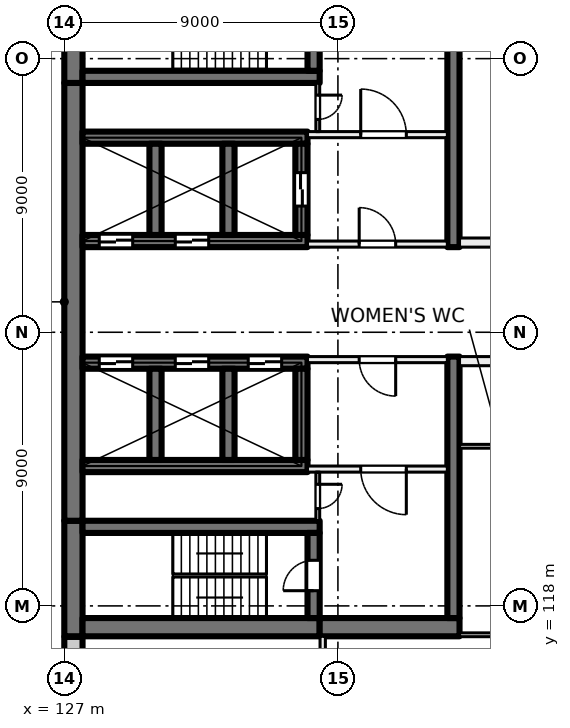
"""IFC4 building model, lengths in metres.
Left out: names, types, materials, properties, quantities, classifications, styles, units other than length and angle.
Written with IfcOpenShell. Run it as: python <this file> out.ifc"""

import sys

from ifc_helpers import new_model, si_unit, direction, frame, frame_2d, origin, place, context, subcontext, project, spatial, rectangle, extrude, element, fill, save


model = new_model("IFC4")
c1 = context("Model", 3, precision=1e-05, world=origin(), true_north=direction((0.0, 1.0)))
c2 = subcontext(c1, "Body", "Model", "MODEL_VIEW")
j1 = project(units=[si_unit("LENGTHUNIT", "METRE"), si_unit("PLANEANGLEUNIT", "RADIAN")], contexts=[c1])
p1 = place(None, origin())
s1 = spatial("IfcSite", under=j1, at=p1, CompositionType="ELEMENT")
p2 = place(p1, origin())
s2 = spatial("IfcBuilding", under=s1, at=p2, CompositionType="ELEMENT")
p3 = place(p2, frame((0.0, 0.0, 67.5)))
s3 = spatial("IfcBuildingStorey", under=s2, at=p3, CompositionType="ELEMENT", Elevation=67.5)
p4 = place(p3, frame((127.3, 117.0, 0.0), z_axis=(0.0, 0.0, 1.0), x_axis=(0.0, 1.0, 0.0)))
e1 = element("IfcWall", 1, at=p4, inside=s3, PredefinedType="SHEAR", context=c2, shape_type="SweptSolid", body=[
    extrude(rectangle(XDim=3.8, YDim=0.6, at=frame_2d((1.9, 0.0))), origin(), (0.0, 0.0, 1.0), 4.0),
])
p5 = place(p3, frame((127.3, 120.8, 0.0), z_axis=(0.0, 0.0, 1.0), x_axis=(0.0, 1.0, 0.0)))
e2 = element("IfcWall", 2, at=p5, inside=s3, PredefinedType="SHEAR", context=c2, shape_type="SweptSolid", body=[
    extrude(rectangle(XDim=14.4, YDim=0.6, at=frame_2d((7.2, 0.0))), origin(), (0.0, 0.0, 1.0), 4.0),
])
p6 = place(p3, frame((127.3, 135.2, 0.0), z_axis=(0.0, 0.0, 1.0), x_axis=(0.0, 1.0, 0.0)))
e3 = element("IfcWall", 3, at=p6, inside=s3, PredefinedType="SHEAR", context=c2, shape_type="SweptSolid", body=[
    extrude(rectangle(XDim=3.8, YDim=0.6, at=frame_2d((1.9, 0.0))), origin(), (0.0, 0.0, 1.0), 4.0),
])
p7 = place(p3, frame((127.6, 117.3, 0.0), z_axis=(0.0, 0.0, 1.0), x_axis=(1.0, 0.0, 0.0)))
e4 = element("IfcWall", 4, at=p7, inside=s3, PredefinedType="SHEAR", context=c2, shape_type="SweptSolid", body=[
    extrude(rectangle(XDim=7.8, YDim=0.6, at=frame_2d((3.9, 0.0))), origin(), (0.0, 0.0, 1.0), 4.0),
])
p8 = place(p3, frame((135.4, 117.3, 0.0), z_axis=(0.0, 0.0, 1.0), x_axis=(1.0, 0.0, 0.0)))
e5 = element("IfcWall", 5, at=p8, inside=s3, PredefinedType="SHEAR", context=c2, shape_type="SweptSolid", body=[
    extrude(rectangle(XDim=4.6, YDim=0.6, at=frame_2d((2.3, 0.0))), origin(), (0.0, 0.0, 1.0), 4.0),
])
p9 = place(p3, frame((127.6, 120.6, 0.0), z_axis=(0.0, 0.0, 1.0), x_axis=(1.0, 0.0, 0.0)))
e6 = element("IfcWall", 6, at=p9, inside=s3, PredefinedType="SHEAR", context=c2, shape_type="SweptSolid", body=[
    extrude(rectangle(XDim=7.8, YDim=0.4, at=frame_2d((3.9, 0.0))), origin(), (0.0, 0.0, 1.0), 4.0),
])
p10 = place(p3, frame((135.2, 117.6, 0.0), z_axis=(0.0, 0.0, 1.0), x_axis=(0.0, 1.0, 0.0)))
e7 = element("IfcWall", 7, at=p10, inside=s3, PredefinedType="SHEAR", context=c2, shape_type="SweptSolid", body=[
    extrude(rectangle(XDim=2.8, YDim=0.4, at=frame_2d((1.4, 0.0))), origin(), (0.0, 0.0, 1.0), 4.0),
])
p11 = place(p10, frame((0.9, 0.0, 0.0)))
e8 = element("IfcOpeningElement", 8, at=p11, cuts=e7, PredefinedType="OPENING", context=c2, shape_type="SweptSolid", body=[
    extrude(rectangle(XDim=1.0, YDim=2.1, at=frame_2d((0.5, 1.05))), frame((0.0, 0.21, 0.0), z_axis=(0.0, -1.0, 0.0), x_axis=(1.0, 0.0, 0.0)), (0.0, 0.0, 1.0), 0.42),
])
p12 = place(p3, frame((127.6, 135.4, 0.0), z_axis=(0.0, 0.0, 1.0), x_axis=(1.0, 0.0, 0.0)))
e9 = element("IfcWall", 9, at=p12, inside=s3, PredefinedType="SHEAR", context=c2, shape_type="SweptSolid", body=[
    extrude(rectangle(XDim=7.8, YDim=0.4, at=frame_2d((3.9, 0.0))), origin(), (0.0, 0.0, 1.0), 4.0),
])
p13 = place(p3, frame((135.2, 135.6, 0.0), z_axis=(0.0, 0.0, 1.0), x_axis=(0.0, 1.0, 0.0)))
e10 = element("IfcWall", 10, at=p13, inside=s3, PredefinedType="SHEAR", context=c2, shape_type="SweptSolid", body=[
    extrude(rectangle(XDim=2.8, YDim=0.4, at=frame_2d((1.4, 0.0))), origin(), (0.0, 0.0, 1.0), 4.0),
])
p14 = place(p13, frame((0.9, 0.0, 0.0)))
e11 = element("IfcOpeningElement", 11, at=p14, cuts=e10, PredefinedType="OPENING", context=c2, shape_type="SweptSolid", body=[
    extrude(rectangle(XDim=1.0, YDim=2.1, at=frame_2d((0.5, 1.05))), frame((0.0, 0.21, 0.0), z_axis=(0.0, -1.0, 0.0), x_axis=(1.0, 0.0, 0.0)), (0.0, 0.0, 1.0), 0.42),
])
p15 = place(p3, frame((127.6, 126.0, 0.0), z_axis=(0.0, 0.0, 1.0), x_axis=(1.0, 0.0, 0.0)))
e12 = element("IfcWall", 12, at=p15, inside=s3, PredefinedType="SHEAR", context=c2, shape_type="SweptSolid", body=[
    extrude(rectangle(XDim=7.4, YDim=0.4, at=frame_2d((3.7, 0.0))), origin(), (0.0, 0.0, 1.0), 4.0),
])
p16 = place(p15, frame((0.55, 0.0, 0.0)))
e13 = element("IfcOpeningElement", 13, at=p16, cuts=e12, PredefinedType="OPENING", context=c2, shape_type="SweptSolid", body=[
    extrude(rectangle(XDim=1.1, YDim=2.1, at=frame_2d((0.55, 1.05))), frame((0.0, 0.21, 0.0), z_axis=(0.0, -1.0, 0.0), x_axis=(1.0, 0.0, 0.0)), (0.0, 0.0, 1.0), 0.42),
])
p17 = place(p15, frame((3.05, 0.0, 0.0)))
e14 = element("IfcOpeningElement", 14, at=p17, cuts=e12, PredefinedType="OPENING", context=c2, shape_type="SweptSolid", body=[
    extrude(rectangle(XDim=1.1, YDim=2.1, at=frame_2d((0.55, 1.05))), frame((0.0, 0.21, 0.0), z_axis=(0.0, -1.0, 0.0), x_axis=(1.0, 0.0, 0.0)), (0.0, 0.0, 1.0), 0.42),
])
p18 = place(p15, frame((5.45, 0.0, 0.0)))
e15 = element("IfcOpeningElement", 15, at=p18, cuts=e12, PredefinedType="OPENING", context=c2, shape_type="SweptSolid", body=[
    extrude(rectangle(XDim=1.1, YDim=2.1, at=frame_2d((0.55, 1.05))), frame((0.0, 0.21, 0.0), z_axis=(0.0, -1.0, 0.0), x_axis=(1.0, 0.0, 0.0)), (0.0, 0.0, 1.0), 0.42),
])
p19 = place(p3, frame((127.6, 122.6, 0.0), z_axis=(0.0, 0.0, 1.0), x_axis=(1.0, 0.0, 0.0)))
e16 = element("IfcWall", 16, at=p19, inside=s3, PredefinedType="SHEAR", context=c2, shape_type="SweptSolid", body=[
    extrude(rectangle(XDim=7.4, YDim=0.4, at=frame_2d((3.7, 0.0))), origin(), (0.0, 0.0, 1.0), 4.0),
])
for number, where, z_axis, x_axis in (
    (17, (130.0, 122.8, 0.0), (0.0, 0.0, 1.0), (0.0, 1.0, 0.0)),
    (18, (132.4, 122.8, 0.0), (0.0, 0.0, 1.0), (0.0, 1.0, 0.0)),
    (19, (134.8, 122.8, 0.0), (0.0, 0.0, 1.0), (0.0, 1.0, 0.0)),
):
    element("IfcWall", number, at=place(p3, frame(where, z_axis=z_axis, x_axis=x_axis)), inside=s3, PredefinedType="SHEAR", context=c2, shape_type="SweptSolid", body=[
        extrude(rectangle(XDim=3.0, YDim=0.4, at=frame_2d((1.5, 0.0))), origin(), (0.0, 0.0, 1.0), 4.0),
    ])
p20 = place(p3, frame((127.6, 130.0, 0.0), z_axis=(0.0, 0.0, 1.0), x_axis=(1.0, 0.0, 0.0)))
e20 = element("IfcWall", 20, at=p20, inside=s3, PredefinedType="SHEAR", context=c2, shape_type="SweptSolid", body=[
    extrude(rectangle(XDim=7.4, YDim=0.4, at=frame_2d((3.7, 0.0))), origin(), (0.0, 0.0, 1.0), 4.0),
])
p21 = place(p20, frame((0.55, 0.0, 0.0)))
e21 = element("IfcOpeningElement", 21, at=p21, cuts=e20, PredefinedType="OPENING", context=c2, shape_type="SweptSolid", body=[
    extrude(rectangle(XDim=1.1, YDim=2.1, at=frame_2d((0.55, 1.05))), frame((0.0, 0.21, 0.0), z_axis=(0.0, -1.0, 0.0), x_axis=(1.0, 0.0, 0.0)), (0.0, 0.0, 1.0), 0.42),
])
p22 = place(p20, frame((3.05, 0.0, 0.0)))
e22 = element("IfcOpeningElement", 22, at=p22, cuts=e20, PredefinedType="OPENING", context=c2, shape_type="SweptSolid", body=[
    extrude(rectangle(XDim=1.1, YDim=2.1, at=frame_2d((0.55, 1.05))), frame((0.0, 0.21, 0.0), z_axis=(0.0, -1.0, 0.0), x_axis=(1.0, 0.0, 0.0)), (0.0, 0.0, 1.0), 0.42),
])
p23 = place(p3, frame((127.6, 133.4, 0.0), z_axis=(0.0, 0.0, 1.0), x_axis=(1.0, 0.0, 0.0)))
e23 = element("IfcWall", 23, at=p23, inside=s3, PredefinedType="SHEAR", context=c2, shape_type="SweptSolid", body=[
    extrude(rectangle(XDim=7.4, YDim=0.4, at=frame_2d((3.7, 0.0))), origin(), (0.0, 0.0, 1.0), 4.0),
])
for number, where, z_axis, x_axis in (
    (24, (130.0, 130.2, 0.0), (0.0, 0.0, 1.0), (0.0, 1.0, 0.0)),
    (25, (132.4, 130.2, 0.0), (0.0, 0.0, 1.0), (0.0, 1.0, 0.0)),
):
    element("IfcWall", number, at=place(p3, frame(where, z_axis=z_axis, x_axis=x_axis)), inside=s3, PredefinedType="SHEAR", context=c2, shape_type="SweptSolid", body=[
        extrude(rectangle(XDim=3.0, YDim=0.4, at=frame_2d((1.5, 0.0))), origin(), (0.0, 0.0, 1.0), 4.0),
    ])
p24 = place(p3, frame((134.8, 130.2, 0.0), z_axis=(0.0, 0.0, 1.0), x_axis=(0.0, 1.0, 0.0)))
e26 = element("IfcWall", 26, at=p24, inside=s3, PredefinedType="SHEAR", context=c2, shape_type="SweptSolid", body=[
    extrude(rectangle(XDim=3.0, YDim=0.4, at=frame_2d((1.5, 0.0))), origin(), (0.0, 0.0, 1.0), 4.0),
])
p25 = place(p24, frame((0.95, 0.0, 0.0)))
e27 = element("IfcOpeningElement", 27, at=p25, cuts=e26, PredefinedType="OPENING", context=c2, shape_type="SweptSolid", body=[
    extrude(rectangle(XDim=1.1, YDim=2.1, at=frame_2d((0.55, 1.05))), frame((0.0, 0.21, 0.0), z_axis=(0.0, -1.0, 0.0), x_axis=(1.0, 0.0, 0.0)), (0.0, 0.0, 1.0), 0.42),
])
for number, where, z_axis, x_axis in (
    (28, (139.8, 117.6, 0.0), (0.0, 0.0, 1.0), (0.0, 1.0, 0.0)),
    (29, (139.8, 129.8, 0.0), (0.0, 0.0, 1.0), (0.0, 1.0, 0.0)),
):
    element("IfcWall", number, at=place(p3, frame(where, z_axis=z_axis, x_axis=x_axis)), inside=s3, PredefinedType="SHEAR", context=c2, shape_type="SweptSolid", body=[
        extrude(rectangle(XDim=8.6, YDim=0.4, at=frame_2d((4.3, 0.0))), origin(), (0.0, 0.0, 1.0), 4.0),
    ])
p26 = place(p3, frame((127.3, 114.07, 0.0), z_axis=(0.0, 0.0, 1.0), x_axis=(0.0, 1.0, 0.0)))
e30 = element("IfcWall", 30, at=p26, inside=s3, PredefinedType="SOLIDWALL", context=c2, shape_type="SweptSolid", body=[
    extrude(rectangle(XDim=2.91, YDim=0.6, at=frame_2d((1.455, 0.0))), origin(), (0.0, 0.0, 1.0), 3.625),
])
p27 = place(p3, frame((135.0, 129.9, 0.0), z_axis=(0.0, 0.0, 1.0), x_axis=(1.0, 0.0, 0.0)))
e31 = element("IfcWall", 31, at=p27, inside=s3, PredefinedType="PARTITIONING", context=c2, shape_type="SweptSolid", body=[
    extrude(rectangle(XDim=4.6, YDim=0.2, at=frame_2d((2.3, 0.0))), origin(), (0.0, 0.0, 1.0), 3.625),
])
p28 = place(p27, frame((1.7, 0.0, 0.0)))
e32 = element("IfcOpeningElement", 32, at=p28, cuts=e31, PredefinedType="OPENING", context=c2, shape_type="SweptSolid", body=[
    extrude(rectangle(XDim=1.2, YDim=2.1, at=frame_2d((0.6, 1.05))), frame((0.0, 0.11, 0.0), z_axis=(0.0, -1.0, 0.0), x_axis=(1.0, 0.0, 0.0)), (0.0, 0.0, 1.0), 0.22),
])
p29 = place(p3, frame((135.0, 133.5, 0.0), z_axis=(0.0, 0.0, 1.0), x_axis=(1.0, 0.0, 0.0)))
e33 = element("IfcWall", 33, at=p29, inside=s3, PredefinedType="PARTITIONING", context=c2, shape_type="SweptSolid", body=[
    extrude(rectangle(XDim=4.6, YDim=0.2, at=frame_2d((2.3, 0.0))), origin(), (0.0, 0.0, 1.0), 3.625),
])
p30 = place(p29, frame((1.75, 0.0, 0.0)))
e34 = element("IfcOpeningElement", 34, at=p30, cuts=e33, PredefinedType="OPENING", context=c2, shape_type="SweptSolid", body=[
    extrude(rectangle(XDim=1.5, YDim=2.1, at=frame_2d((0.75, 1.05))), frame((0.0, 0.11, 0.0), z_axis=(0.0, -1.0, 0.0), x_axis=(1.0, 0.0, 0.0)), (0.0, 0.0, 1.0), 0.22),
])
p31 = place(p3, frame((135.337, 135.2, 0.0), z_axis=(0.0, 0.0, 1.0), x_axis=(0.0, -1.0, 0.0)))
e35 = element("IfcWall", 35, at=p31, inside=s3, PredefinedType="PARTITIONING", context=c2, shape_type="SweptSolid", body=[
    extrude(rectangle(XDim=1.6, YDim=0.125, at=frame_2d((0.8, 0.0))), origin(), (0.0, 0.0, 1.0), 3.625),
])
p32 = place(p31, frame((0.4, 0.0, 0.0)))
e36 = element("IfcOpeningElement", 36, at=p32, cuts=e35, PredefinedType="OPENING", context=c2, shape_type="SweptSolid", body=[
    extrude(rectangle(XDim=0.8, YDim=2.1, at=frame_2d((0.4, 1.05))), frame((0.0, 0.073, 0.0), z_axis=(0.0, -1.0, 0.0), x_axis=(1.0, 0.0, 0.0)), (0.0, 0.0, 1.0), 0.145),
])
p33 = place(p3, frame((139.6, 126.1, 0.0), z_axis=(0.0, 0.0, 1.0), x_axis=(-1.0, 0.0, 0.0)))
e37 = element("IfcWall", 37, at=p33, inside=s3, PredefinedType="PARTITIONING", context=c2, shape_type="SweptSolid", body=[
    extrude(rectangle(XDim=4.6, YDim=0.2, at=frame_2d((2.3, 0.0))), origin(), (0.0, 0.0, 1.0), 3.625),
])
p34 = place(p33, frame((1.7, 0.0, 0.0)))
e38 = element("IfcOpeningElement", 38, at=p34, cuts=e37, PredefinedType="OPENING", context=c2, shape_type="SweptSolid", body=[
    extrude(rectangle(XDim=1.2, YDim=2.1, at=frame_2d((0.6, 1.05))), frame((0.0, 0.11, 0.0), z_axis=(0.0, -1.0, 0.0), x_axis=(1.0, 0.0, 0.0)), (0.0, 0.0, 1.0), 0.22),
])
p35 = place(p3, frame((139.6, 122.5, 0.0), z_axis=(0.0, 0.0, 1.0), x_axis=(-1.0, 0.0, 0.0)))
e39 = element("IfcWall", 39, at=p35, inside=s3, PredefinedType="PARTITIONING", context=c2, shape_type="SweptSolid", body=[
    extrude(rectangle(XDim=4.6, YDim=0.2, at=frame_2d((2.3, 0.0))), origin(), (0.0, 0.0, 1.0), 3.625),
])
p36 = place(p35, frame((1.35, 0.0, 0.0)))
e40 = element("IfcOpeningElement", 40, at=p36, cuts=e39, PredefinedType="OPENING", context=c2, shape_type="SweptSolid", body=[
    extrude(rectangle(XDim=1.5, YDim=2.1, at=frame_2d((0.75, 1.05))), frame((0.0, 0.11, 0.0), z_axis=(0.0, -1.0, 0.0), x_axis=(1.0, 0.0, 0.0)), (0.0, 0.0, 1.0), 0.22),
])
p37 = place(p3, frame((135.337, 122.4, 0.0), z_axis=(0.0, 0.0, 1.0), x_axis=(0.0, -1.0, 0.0)))
e41 = element("IfcWall", 41, at=p37, inside=s3, PredefinedType="PARTITIONING", context=c2, shape_type="SweptSolid", body=[
    extrude(rectangle(XDim=1.6, YDim=0.125, at=frame_2d((0.8, 0.0))), origin(), (0.0, 0.0, 1.0), 3.625),
])
p38 = place(p37, frame((0.4, 0.0, 0.0)))
e42 = element("IfcOpeningElement", 42, at=p38, cuts=e41, PredefinedType="OPENING", context=c2, shape_type="SweptSolid", body=[
    extrude(rectangle(XDim=0.8, YDim=2.1, at=frame_2d((0.4, 1.05))), frame((0.0, 0.073, 0.0), z_axis=(0.0, -1.0, 0.0), x_axis=(1.0, 0.0, 0.0)), (0.0, 0.0, 1.0), 0.145),
])
p39 = place(p3, frame((135.5, 117.0, 0.0), z_axis=(0.0, 0.0, 1.0), x_axis=(0.0, -1.0, 0.0)))
e43 = element("IfcWall", 43, at=p39, inside=s3, PredefinedType="PARTITIONING", context=c2, shape_type="SweptSolid", body=[
    extrude(rectangle(XDim=6.4, YDim=0.175, at=frame_2d((3.2, 0.0))), origin(), (0.0, 0.0, 1.0), 3.625),
])
p40 = place(p39, frame((2.6, 0.0, 0.0)))
e44 = element("IfcOpeningElement", 44, at=p40, cuts=e43, PredefinedType="OPENING", context=c2, shape_type="SweptSolid", body=[
    extrude(rectangle(XDim=1.2, YDim=2.1, at=frame_2d((0.6, 1.05))), frame((0.0, 0.097, 0.0), z_axis=(0.0, -1.0, 0.0), x_axis=(1.0, 0.0, 0.0)), (0.0, 0.0, 1.0), 0.195),
])
p41 = place(p3, frame((140.0, 117.05, 0.0), z_axis=(0.0, 0.0, 1.0), x_axis=(1.0, 0.0, 0.0)))
e45 = element("IfcWall", 45, at=p41, inside=s3, PredefinedType="PARTITIONING", context=c2, shape_type="SweptSolid", body=[
    extrude(rectangle(XDim=8.938, YDim=0.125, at=frame_2d((4.469, 0.0))), origin(), (0.0, 0.0, 1.0), 3.625),
])
p42 = place(p3, frame((148.938, 123.25, 0.0), z_axis=(0.0, 0.0, 1.0), x_axis=(-1.0, 0.0, 0.0)))
e46 = element("IfcWall", 46, at=p42, inside=s3, PredefinedType="PARTITIONING", context=c2, shape_type="SweptSolid", body=[
    extrude(rectangle(XDim=8.938, YDim=0.125, at=frame_2d((4.469, 0.0))), origin(), (0.0, 0.0, 1.0), 3.625),
])
p43 = place(p42, frame((6.288, 0.0, 0.0)))
e47 = element("IfcOpeningElement", 47, at=p43, cuts=e46, PredefinedType="OPENING", context=c2, shape_type="SweptSolid", body=[
    extrude(rectangle(XDim=0.8, YDim=2.1, at=frame_2d((0.4, 1.05))), frame((0.0, 0.073, 0.0), z_axis=(0.0, -1.0, 0.0), x_axis=(1.0, 0.0, 0.0)), (0.0, 0.0, 1.0), 0.145),
])
p44 = place(p42, frame((3.037, 0.0, 0.0)))
e48 = element("IfcOpeningElement", 48, at=p44, cuts=e46, PredefinedType="OPENING", context=c2, shape_type="SweptSolid", body=[
    extrude(rectangle(XDim=0.8, YDim=2.1, at=frame_2d((0.4, 1.05))), frame((0.0, 0.073, 0.0), z_axis=(0.0, -1.0, 0.0), x_axis=(1.0, 0.0, 0.0)), (0.0, 0.0, 1.0), 0.145),
])
p45 = place(p3, frame((140.0, 129.95, 0.0), z_axis=(0.0, 0.0, 1.0), x_axis=(1.0, 0.0, 0.0)))
e49 = element("IfcWall", 49, at=p45, inside=s3, PredefinedType="PARTITIONING", context=c2, shape_type="SweptSolid", body=[
    extrude(rectangle(XDim=14.0, YDim=0.3, at=frame_2d((7.0, 0.0))), origin(), (0.0, 0.0, 1.0), 3.625),
])
p46 = place(p45, frame((6.1, 0.0, 0.0)))
e50 = element("IfcOpeningElement", 50, at=p46, cuts=e49, PredefinedType="OPENING", context=c2, shape_type="SweptSolid", body=[
    extrude(rectangle(XDim=1.8, YDim=2.1, at=frame_2d((0.9, 1.05))), frame((0.0, 0.16, 0.0), z_axis=(0.0, -1.0, 0.0), x_axis=(1.0, 0.0, 0.0)), (0.0, 0.0, 1.0), 0.32),
])
p47 = place(p3, frame((154.0, 126.05, 0.0), z_axis=(0.0, 0.0, 1.0), x_axis=(-1.0, 0.0, 0.0)))
e51 = element("IfcWall", 51, at=p47, inside=s3, PredefinedType="PARTITIONING", context=c2, shape_type="SweptSolid", body=[
    extrude(rectangle(XDim=14.0, YDim=0.3, at=frame_2d((7.0, 0.0))), origin(), (0.0, 0.0, 1.0), 3.625),
])
p48 = place(p47, frame((10.25, 0.0, 0.0)))
e52 = element("IfcOpeningElement", 52, at=p48, cuts=e51, PredefinedType="OPENING", context=c2, shape_type="SweptSolid", body=[
    extrude(rectangle(XDim=1.0, YDim=2.1, at=frame_2d((0.5, 1.05))), frame((0.0, 0.16, 0.0), z_axis=(0.0, -1.0, 0.0), x_axis=(1.0, 0.0, 0.0)), (0.0, 0.0, 1.0), 0.32),
])
p49 = place(p47, frame((1.6, 0.0, 0.0)))
e53 = element("IfcOpeningElement", 53, at=p49, cuts=e51, PredefinedType="OPENING", context=c2, shape_type="SweptSolid", body=[
    extrude(rectangle(XDim=1.8, YDim=2.1, at=frame_2d((0.9, 1.05))), frame((0.0, 0.16, 0.0), z_axis=(0.0, -1.0, 0.0), x_axis=(1.0, 0.0, 0.0)), (0.0, 0.0, 1.0), 0.32),
])
p50 = place(p21, origin())
e54 = element("IfcDoor", 54, at=p50, inside=s3, OperationType="DOUBLE_DOOR_SLIDING", PredefinedType="DOOR", context=c2, shape_type="SweptSolid", body=[
    extrude(rectangle(XDim=1.1, YDim=2.1, at=frame_2d((0.55, 1.05))), frame((0.0, 0.025, 0.0), z_axis=(0.0, -1.0, 0.0), x_axis=(1.0, 0.0, 0.0)), (0.0, 0.0, 1.0), 0.05),
])
fill(e21, e54)
p51 = place(p22, origin())
e55 = element("IfcDoor", 55, at=p51, inside=s3, OperationType="DOUBLE_DOOR_SLIDING", PredefinedType="DOOR", context=c2, shape_type="SweptSolid", body=[
    extrude(rectangle(XDim=1.1, YDim=2.1, at=frame_2d((0.55, 1.05))), frame((0.0, 0.025, 0.0), z_axis=(0.0, -1.0, 0.0), x_axis=(1.0, 0.0, 0.0)), (0.0, 0.0, 1.0), 0.05),
])
fill(e22, e55)
p52 = place(p16, origin())
e56 = element("IfcDoor", 56, at=p52, inside=s3, OperationType="DOUBLE_DOOR_SLIDING", PredefinedType="DOOR", context=c2, shape_type="SweptSolid", body=[
    extrude(rectangle(XDim=1.1, YDim=2.1, at=frame_2d((0.55, 1.05))), frame((0.0, 0.025, 0.0), z_axis=(0.0, -1.0, 0.0), x_axis=(1.0, 0.0, 0.0)), (0.0, 0.0, 1.0), 0.05),
])
fill(e13, e56)
p53 = place(p17, origin())
e57 = element("IfcDoor", 57, at=p53, inside=s3, OperationType="DOUBLE_DOOR_SLIDING", PredefinedType="DOOR", context=c2, shape_type="SweptSolid", body=[
    extrude(rectangle(XDim=1.1, YDim=2.1, at=frame_2d((0.55, 1.05))), frame((0.0, 0.025, 0.0), z_axis=(0.0, -1.0, 0.0), x_axis=(1.0, 0.0, 0.0)), (0.0, 0.0, 1.0), 0.05),
])
fill(e14, e57)
p54 = place(p18, origin())
e58 = element("IfcDoor", 58, at=p54, inside=s3, OperationType="DOUBLE_DOOR_SLIDING", PredefinedType="DOOR", context=c2, shape_type="SweptSolid", body=[
    extrude(rectangle(XDim=1.1, YDim=2.1, at=frame_2d((0.55, 1.05))), frame((0.0, 0.025, 0.0), z_axis=(0.0, -1.0, 0.0), x_axis=(1.0, 0.0, 0.0)), (0.0, 0.0, 1.0), 0.05),
])
fill(e15, e58)
p55 = place(p28, origin())
e59 = element("IfcDoor", 59, at=p55, inside=s3, OperationType="DOUBLE_DOOR_SINGLE_SWING", PredefinedType="DOOR", context=c2, shape_type="SweptSolid", body=[
    extrude(rectangle(XDim=1.2, YDim=2.1, at=frame_2d((0.6, 1.05))), frame((0.0, 0.025, 0.0), z_axis=(0.0, -1.0, 0.0), x_axis=(1.0, 0.0, 0.0)), (0.0, 0.0, 1.0), 0.05),
])
fill(e32, e59)
p56 = place(p30, origin())
e60 = element("IfcDoor", 60, at=p56, inside=s3, OperationType="DOUBLE_DOOR_SINGLE_SWING", PredefinedType="DOOR", context=c2, shape_type="SweptSolid", body=[
    extrude(rectangle(XDim=1.5, YDim=2.1, at=frame_2d((0.75, 1.05))), frame((0.0, 0.025, 0.0), z_axis=(0.0, -1.0, 0.0), x_axis=(1.0, 0.0, 0.0)), (0.0, 0.0, 1.0), 0.05),
])
fill(e34, e60)
p57 = place(p32, origin())
e61 = element("IfcDoor", 61, at=p57, inside=s3, OperationType="SINGLE_SWING_RIGHT", PredefinedType="DOOR", context=c2, shape_type="SweptSolid", body=[
    extrude(rectangle(XDim=0.8, YDim=2.1, at=frame_2d((0.4, 1.05))), frame((0.0, 0.025, 0.0), z_axis=(0.0, -1.0, 0.0), x_axis=(1.0, 0.0, 0.0)), (0.0, 0.0, 1.0), 0.05),
])
fill(e36, e61)
p58 = place(p34, origin())
e62 = element("IfcDoor", 62, at=p58, inside=s3, OperationType="DOUBLE_DOOR_SINGLE_SWING", PredefinedType="DOOR", context=c2, shape_type="SweptSolid", body=[
    extrude(rectangle(XDim=1.2, YDim=2.1, at=frame_2d((0.6, 1.05))), frame((0.0, 0.025, 0.0), z_axis=(0.0, -1.0, 0.0), x_axis=(1.0, 0.0, 0.0)), (0.0, 0.0, 1.0), 0.05),
])
fill(e38, e62)
p59 = place(p36, origin())
e63 = element("IfcDoor", 63, at=p59, inside=s3, OperationType="DOUBLE_DOOR_SINGLE_SWING", PredefinedType="DOOR", context=c2, shape_type="SweptSolid", body=[
    extrude(rectangle(XDim=1.5, YDim=2.1, at=frame_2d((0.75, 1.05))), frame((0.0, 0.025, 0.0), z_axis=(0.0, -1.0, 0.0), x_axis=(1.0, 0.0, 0.0)), (0.0, 0.0, 1.0), 0.05),
])
fill(e40, e63)
p60 = place(p11, origin())
e64 = element("IfcDoor", 64, at=p60, inside=s3, OperationType="SINGLE_SWING_RIGHT", PredefinedType="DOOR", context=c2, shape_type="SweptSolid", body=[
    extrude(rectangle(XDim=1.0, YDim=2.1, at=frame_2d((0.5, 1.05))), frame((0.0, 0.025, 0.0), z_axis=(0.0, -1.0, 0.0), x_axis=(1.0, 0.0, 0.0)), (0.0, 0.0, 1.0), 0.05),
])
fill(e8, e64)
p61 = place(p38, origin())
e65 = element("IfcDoor", 65, at=p61, inside=s3, OperationType="SINGLE_SWING_LEFT", PredefinedType="DOOR", context=c2, shape_type="SweptSolid", body=[
    extrude(rectangle(XDim=0.8, YDim=2.1, at=frame_2d((0.4, 1.05))), frame((0.0, 0.025, 0.0), z_axis=(0.0, -1.0, 0.0), x_axis=(1.0, 0.0, 0.0)), (0.0, 0.0, 1.0), 0.05),
])
fill(e42, e65)
p62 = place(p25, origin())
e66 = element("IfcDoor", 66, at=p62, inside=s3, OperationType="DOUBLE_DOOR_SLIDING", PredefinedType="DOOR", context=c2, shape_type="SweptSolid", body=[
    extrude(rectangle(XDim=1.1, YDim=2.1, at=frame_2d((0.55, 1.05))), frame((0.0, 0.025, 0.0), z_axis=(0.0, -1.0, 0.0), x_axis=(1.0, 0.0, 0.0)), (0.0, 0.0, 1.0), 0.05),
])
fill(e27, e66)
save(model, sys.argv[1])
